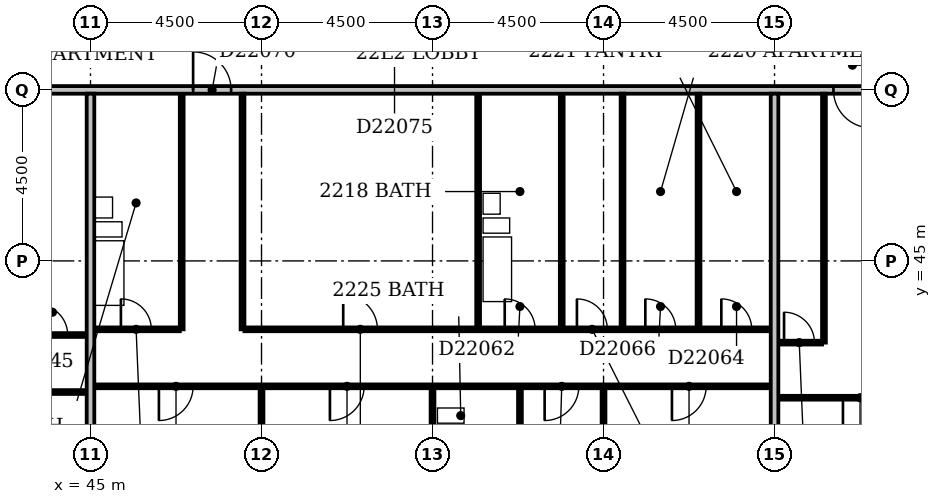
"""IFC4 building model, lengths in metres.
Left out: names, types, materials, properties, quantities, classifications, styles, units other than length and angle.
Written with IfcOpenShell. Run it as: python <this file> out.ifc"""

import sys

from ifc_helpers import new_model, si_unit, direction, frame, frame_2d, origin, place, context, subcontext, project, spatial, rectangle, extrude, element, fill, save


model = new_model("IFC4")
c1 = context("Model", 3, precision=1e-05, world=origin(), true_north=direction((0.0, 1.0)))
c2 = subcontext(c1, "Body", "Model", "MODEL_VIEW")
j1 = project(units=[si_unit("LENGTHUNIT", "METRE"), si_unit("PLANEANGLEUNIT", "RADIAN")], contexts=[c1])
p1 = place(None, origin())
s1 = spatial("IfcSite", under=j1, at=p1, CompositionType="ELEMENT")
p2 = place(p1, origin())
s2 = spatial("IfcBuilding", under=s1, at=p2, CompositionType="ELEMENT")
p3 = place(p2, frame((0.0, 0.0, 90.2)))
s3 = spatial("IfcBuildingStorey", under=s2, at=p3, CompositionType="ELEMENT", Elevation=90.2)
p4 = place(p3, frame((45.0, 36.6, 0.0), z_axis=(0.0, 0.0, 1.0), x_axis=(0.0, 1.0, 0.0)))
e1 = element("IfcWall", 1, at=p4, inside=s3, PredefinedType="PARTITIONING", context=c2, shape_type="SweptSolid", body=[
    extrude(rectangle(XDim=12.8, YDim=0.2, at=frame_2d((6.4, 0.0))), origin(), (0.0, 0.0, 1.0), 2.6),
])
p5 = place(p3, frame((49.5, 36.6, 0.0), z_axis=(0.0, 0.0, 1.0), x_axis=(0.0, 1.0, 0.0)))
e2 = element("IfcWall", 2, at=p5, inside=s3, PredefinedType="PARTITIONING", context=c2, shape_type="SweptSolid", body=[
    extrude(rectangle(XDim=5.05, YDim=0.1, at=frame_2d((2.525, 0.0))), origin(), (0.0, 0.0, 1.0), 3.3),
])
p6 = place(p3, frame((54.0, 36.6, 0.0), z_axis=(0.0, 0.0, 1.0), x_axis=(0.0, 1.0, 0.0)))
e3 = element("IfcWall", 3, at=p6, inside=s3, PredefinedType="PARTITIONING", context=c2, shape_type="SweptSolid", body=[
    extrude(rectangle(XDim=5.05, YDim=0.1, at=frame_2d((2.525, 0.0))), origin(), (0.0, 0.0, 1.0), 2.6),
])
p7 = place(p3, frame((58.5, 36.6, 0.0), z_axis=(0.0, 0.0, 1.0), x_axis=(0.0, 1.0, 0.0)))
e4 = element("IfcWall", 4, at=p7, inside=s3, PredefinedType="PARTITIONING", context=c2, shape_type="SweptSolid", body=[
    extrude(rectangle(XDim=5.05, YDim=0.1, at=frame_2d((2.525, 0.0))), origin(), (0.0, 0.0, 1.0), 3.3),
])
p8 = place(p3, frame((63.0, 36.6, 0.0), z_axis=(0.0, 0.0, 1.0), x_axis=(0.0, 1.0, 0.0)))
e5 = element("IfcWall", 5, at=p8, inside=s3, PredefinedType="PARTITIONING", context=c2, shape_type="SweptSolid", body=[
    extrude(rectangle(XDim=12.8, YDim=0.2, at=frame_2d((6.4, 0.0))), origin(), (0.0, 0.0, 1.0), 2.4),
])
p9 = place(p3, frame((56.3, 38.8, 0.0), z_axis=(0.0, 0.0, 1.0), x_axis=(0.0, 1.0, 0.0)))
e6 = element("IfcWall", 6, at=p9, inside=s3, PredefinedType="PLUMBINGWALL", context=c2, shape_type="SweptSolid", body=[
    extrude(rectangle(XDim=2.85, YDim=0.1, at=frame_2d((1.425, 0.0))), origin(), (0.0, 0.0, 1.0), 3.3),
])
p10 = place(p9, frame((1.05, 0.0, 0.0)))
e7 = element("IfcOpeningElement", 7, at=p10, cuts=e6, PredefinedType="OPENING", context=c2, shape_type="SweptSolid", body=[
    extrude(rectangle(XDim=0.8, YDim=2.1, at=frame_2d((0.4, 1.05))), frame((0.0, 0.062, 0.0), z_axis=(0.0, -1.0, 0.0), x_axis=(1.0, 0.0, 0.0)), (0.0, 0.0, 1.0), 0.124),
])
p11 = place(p3, frame((63.1, 41.4, 0.0), z_axis=(0.0, 0.0, 1.0), x_axis=(1.0, 0.0, 0.0)))
e8 = element("IfcWall", 8, at=p11, inside=s3, PredefinedType="PARTITIONING", context=c2, shape_type="SweptSolid", body=[
    extrude(rectangle(XDim=5.0, YDim=0.1, at=frame_2d((2.5, 0.0))), origin(), (0.0, 0.0, 1.0), 3.3),
])
p12 = place(p11, frame((1.7, 0.0, 0.0)))
e9 = element("IfcOpeningElement", 9, at=p12, cuts=e8, PredefinedType="OPENING", context=c2, shape_type="SweptSolid", body=[
    extrude(rectangle(XDim=0.9, YDim=2.1, at=frame_2d((0.45, 1.05))), frame((0.0, 0.062, 0.0), z_axis=(0.0, -1.0, 0.0), x_axis=(1.0, 0.0, 0.0)), (0.0, 0.0, 1.0), 0.124),
])
p13 = place(p3, frame((31.6, 41.55, 0.0), z_axis=(0.0, 0.0, 1.0), x_axis=(1.0, 0.0, 0.0)))
e10 = element("IfcWall", 10, at=p13, inside=s3, PredefinedType="PARTITIONING", context=c2, shape_type="SweptSolid", body=[
    extrude(rectangle(XDim=13.3, YDim=0.1, at=frame_2d((6.65, 0.0))), origin(), (0.0, 0.0, 1.0), 3.3),
])
p14 = place(p13, frame((3.9, 0.0, 0.0)))
e11 = element("IfcOpeningElement", 11, at=p14, cuts=e10, PredefinedType="OPENING", context=c2, shape_type="SweptSolid", body=[
    extrude(rectangle(XDim=0.9, YDim=2.1, at=frame_2d((0.45, 1.05))), frame((0.0, 0.062, 0.0), z_axis=(0.0, -1.0, 0.0), x_axis=(1.0, 0.0, 0.0)), (0.0, 0.0, 1.0), 0.124),
])
p15 = place(p13, frame((10.7, 0.0, 0.0)))
e12 = element("IfcOpeningElement", 12, at=p15, cuts=e10, PredefinedType="OPENING", context=c2, shape_type="SweptSolid", body=[
    extrude(rectangle(XDim=0.9, YDim=2.1, at=frame_2d((0.45, 1.05))), frame((0.0, 0.062, 0.0), z_axis=(0.0, -1.0, 0.0), x_axis=(1.0, 0.0, 0.0)), (0.0, 0.0, 1.0), 0.124),
])
p16 = place(p3, frame((45.1, 41.7, 0.0), z_axis=(0.0, 0.0, 1.0), x_axis=(1.0, 0.0, 0.0)))
e13 = element("IfcWall", 13, at=p16, inside=s3, PredefinedType="PARTITIONING", context=c2, shape_type="SweptSolid", body=[
    extrude(rectangle(XDim=17.8, YDim=0.1, at=frame_2d((8.9, 0.0))), origin(), (0.0, 0.0, 1.0), 3.3),
])
p17 = place(p16, frame((1.7, 0.0, 0.0)))
e14 = element("IfcOpeningElement", 14, at=p17, cuts=e13, PredefinedType="OPENING", context=c2, shape_type="SweptSolid", body=[
    extrude(rectangle(XDim=0.9, YDim=2.1, at=frame_2d((0.45, 1.05))), frame((0.0, 0.062, 0.0), z_axis=(0.0, -1.0, 0.0), x_axis=(1.0, 0.0, 0.0)), (0.0, 0.0, 1.0), 0.124),
])
p18 = place(p16, frame((6.2, 0.0, 0.0)))
e15 = element("IfcOpeningElement", 15, at=p18, cuts=e13, PredefinedType="OPENING", context=c2, shape_type="SweptSolid", body=[
    extrude(rectangle(XDim=0.9, YDim=2.1, at=frame_2d((0.45, 1.05))), frame((0.0, 0.062, 0.0), z_axis=(0.0, -1.0, 0.0), x_axis=(1.0, 0.0, 0.0)), (0.0, 0.0, 1.0), 0.124),
])
p19 = place(p16, frame((11.85, 0.0, 0.0)))
e16 = element("IfcOpeningElement", 16, at=p19, cuts=e13, PredefinedType="OPENING", context=c2, shape_type="SweptSolid", body=[
    extrude(rectangle(XDim=0.9, YDim=2.1, at=frame_2d((0.45, 1.05))), frame((0.0, 0.062, 0.0), z_axis=(0.0, -1.0, 0.0), x_axis=(1.0, 0.0, 0.0)), (0.0, 0.0, 1.0), 0.124),
])
p20 = place(p16, frame((15.2, 0.0, 0.0)))
e17 = element("IfcOpeningElement", 17, at=p20, cuts=e13, PredefinedType="OPENING", context=c2, shape_type="SweptSolid", body=[
    extrude(rectangle(XDim=0.9, YDim=2.1, at=frame_2d((0.45, 1.05))), frame((0.0, 0.062, 0.0), z_axis=(0.0, -1.0, 0.0), x_axis=(1.0, 0.0, 0.0)), (0.0, 0.0, 1.0), 0.124),
])
p21 = place(p3, frame((63.1, 42.85, 0.0), z_axis=(0.0, 0.0, 1.0), x_axis=(1.0, 0.0, 0.0)))
e18 = element("IfcWall", 18, at=p21, inside=s3, PredefinedType="PARTITIONING", context=c2, shape_type="SweptSolid", body=[
    extrude(rectangle(XDim=1.15, YDim=0.1, at=frame_2d((0.575, 0.0))), origin(), (0.0, 0.0, 1.0), 3.3),
])
p22 = place(p21, frame((0.15, 0.0, 0.0)))
e19 = element("IfcOpeningElement", 19, at=p22, cuts=e18, PredefinedType="OPENING", context=c2, shape_type="SweptSolid", body=[
    extrude(rectangle(XDim=0.8, YDim=2.1, at=frame_2d((0.4, 1.05))), frame((0.0, 0.062, 0.0), z_axis=(0.0, -1.0, 0.0), x_axis=(1.0, 0.0, 0.0)), (0.0, 0.0, 1.0), 0.124),
])
p23 = place(p3, frame((64.3, 42.85, 0.0), z_axis=(0.0, 0.0, 1.0), x_axis=(0.0, 1.0, 0.0)))
e20 = element("IfcWall", 20, at=p23, inside=s3, PredefinedType="PARTITIONING", context=c2, shape_type="SweptSolid", body=[
    extrude(rectangle(XDim=6.55, YDim=0.1, at=frame_2d((3.275, 0.0))), origin(), (0.0, 0.0, 1.0), 3.3),
])
p24 = place(p3, frame((33.15, 43.05, 0.0), z_axis=(0.0, 0.0, 1.0), x_axis=(1.0, 0.0, 0.0)))
e21 = element("IfcWall", 21, at=p24, inside=s3, PredefinedType="PARTITIONING", context=c2, shape_type="SweptSolid", body=[
    extrude(rectangle(XDim=11.75, YDim=0.1, at=frame_2d((5.875, 0.0))), origin(), (0.0, 0.0, 1.0), 3.3),
])
p25 = place(p24, frame((5.15, 0.0, 0.0)))
e22 = element("IfcOpeningElement", 22, at=p25, cuts=e21, PredefinedType="OPENING", context=c2, shape_type="SweptSolid", body=[
    extrude(rectangle(XDim=0.8, YDim=2.1, at=frame_2d((0.4, 1.05))), frame((0.0, 0.062, 0.0), z_axis=(0.0, -1.0, 0.0), x_axis=(1.0, 0.0, 0.0)), (0.0, 0.0, 1.0), 0.124),
])
p26 = place(p24, frame((1.7, 0.0, 0.0)))
e23 = element("IfcOpeningElement", 23, at=p26, cuts=e21, PredefinedType="OPENING", context=c2, shape_type="SweptSolid", body=[
    extrude(rectangle(XDim=0.9, YDim=2.1, at=frame_2d((0.45, 1.05))), frame((0.0, 0.062, 0.0), z_axis=(0.0, -1.0, 0.0), x_axis=(1.0, 0.0, 0.0)), (0.0, 0.0, 1.0), 0.124),
])
p27 = place(p24, frame((8.65, 0.0, 0.0)))
e24 = element("IfcOpeningElement", 24, at=p27, cuts=e21, PredefinedType="OPENING", context=c2, shape_type="SweptSolid", body=[
    extrude(rectangle(XDim=0.8, YDim=2.1, at=frame_2d((0.4, 1.05))), frame((0.0, 0.062, 0.0), z_axis=(0.0, -1.0, 0.0), x_axis=(1.0, 0.0, 0.0)), (0.0, 0.0, 1.0), 0.124),
])
p28 = place(p24, frame((10.45, 0.0, 0.0)))
e25 = element("IfcOpeningElement", 25, at=p28, cuts=e21, PredefinedType="OPENING", context=c2, shape_type="SweptSolid", body=[
    extrude(rectangle(XDim=0.8, YDim=2.1, at=frame_2d((0.4, 1.05))), frame((0.0, 0.062, 0.0), z_axis=(0.0, -1.0, 0.0), x_axis=(1.0, 0.0, 0.0)), (0.0, 0.0, 1.0), 0.124),
])
p29 = place(p24, frame((7.1, 0.0, 0.0)))
e26 = element("IfcOpeningElement", 26, at=p29, cuts=e21, PredefinedType="OPENING", context=c2, shape_type="SweptSolid", body=[
    extrude(rectangle(XDim=0.8, YDim=2.1, at=frame_2d((0.4, 1.05))), frame((0.0, 0.062, 0.0), z_axis=(0.0, -1.0, 0.0), x_axis=(1.0, 0.0, 0.0)), (0.0, 0.0, 1.0), 0.124),
])
p30 = place(p3, frame((45.1, 43.2, 0.0), z_axis=(0.0, 0.0, 1.0), x_axis=(1.0, 0.0, 0.0)))
e27 = element("IfcWall", 27, at=p30, inside=s3, PredefinedType="PARTITIONING", context=c2, shape_type="SweptSolid", body=[
    extrude(rectangle(XDim=2.25, YDim=0.1, at=frame_2d((1.125, 0.0))), origin(), (0.0, 0.0, 1.0), 3.3),
])
p31 = place(p30, frame((0.7, 0.0, 0.0)))
e28 = element("IfcOpeningElement", 28, at=p31, cuts=e27, PredefinedType="OPENING", context=c2, shape_type="SweptSolid", body=[
    extrude(rectangle(XDim=0.8, YDim=2.1, at=frame_2d((0.4, 1.05))), frame((0.0, 0.062, 0.0), z_axis=(0.0, -1.0, 0.0), x_axis=(1.0, 0.0, 0.0)), (0.0, 0.0, 1.0), 0.124),
])
p32 = place(p3, frame((47.4, 43.2, 0.0), z_axis=(0.0, 0.0, 1.0), x_axis=(0.0, 1.0, 0.0)))
e29 = element("IfcWall", 29, at=p32, inside=s3, PredefinedType="PLUMBINGWALL", context=c2, shape_type="SweptSolid", body=[
    extrude(rectangle(XDim=6.2, YDim=0.1, at=frame_2d((3.1, 0.0))), origin(), (0.0, 0.0, 1.0), 3.3),
])
p33 = place(p3, frame((49.0, 43.2, 0.0), z_axis=(0.0, 0.0, 1.0), x_axis=(0.0, 1.0, 0.0)))
e30 = element("IfcWall", 30, at=p33, inside=s3, PredefinedType="PARTITIONING", context=c2, shape_type="SweptSolid", body=[
    extrude(rectangle(XDim=6.2, YDim=0.1, at=frame_2d((3.1, 0.0))), origin(), (0.0, 0.0, 1.0), 3.3),
])
p34 = place(p3, frame((49.05, 43.2, 0.0), z_axis=(0.0, 0.0, 1.0), x_axis=(1.0, 0.0, 0.0)))
e31 = element("IfcWall", 31, at=p34, inside=s3, PredefinedType="PARTITIONING", context=c2, shape_type="SweptSolid", body=[
    extrude(rectangle(XDim=13.85, YDim=0.1, at=frame_2d((6.925, 0.0))), origin(), (0.0, 0.0, 1.0), 3.3),
])
p35 = place(p34, frame((6.85, 0.0, 0.0)))
e32 = element("IfcOpeningElement", 32, at=p35, cuts=e31, PredefinedType="OPENING", context=c2, shape_type="SweptSolid", body=[
    extrude(rectangle(XDim=0.8, YDim=2.1, at=frame_2d((0.4, 1.05))), frame((0.0, 0.062, 0.0), z_axis=(0.0, -1.0, 0.0), x_axis=(1.0, 0.0, 0.0)), (0.0, 0.0, 1.0), 0.124),
])
p36 = place(p34, frame((2.6, 0.0, 0.0)))
e33 = element("IfcOpeningElement", 33, at=p36, cuts=e31, PredefinedType="OPENING", context=c2, shape_type="SweptSolid", body=[
    extrude(rectangle(XDim=0.9, YDim=2.1, at=frame_2d((0.45, 1.05))), frame((0.0, 0.062, 0.0), z_axis=(0.0, -1.0, 0.0), x_axis=(1.0, 0.0, 0.0)), (0.0, 0.0, 1.0), 0.124),
])
p37 = place(p34, frame((12.55, 0.0, 0.0)))
e34 = element("IfcOpeningElement", 34, at=p37, cuts=e31, PredefinedType="OPENING", context=c2, shape_type="SweptSolid", body=[
    extrude(rectangle(XDim=0.8, YDim=2.1, at=frame_2d((0.4, 1.05))), frame((0.0, 0.062, 0.0), z_axis=(0.0, -1.0, 0.0), x_axis=(1.0, 0.0, 0.0)), (0.0, 0.0, 1.0), 0.124),
])
p38 = place(p34, frame((8.75, 0.0, 0.0)))
e35 = element("IfcOpeningElement", 35, at=p38, cuts=e31, PredefinedType="OPENING", context=c2, shape_type="SweptSolid", body=[
    extrude(rectangle(XDim=0.8, YDim=2.1, at=frame_2d((0.4, 1.05))), frame((0.0, 0.062, 0.0), z_axis=(0.0, -1.0, 0.0), x_axis=(1.0, 0.0, 0.0)), (0.0, 0.0, 1.0), 0.124),
])
p39 = place(p34, frame((10.55, 0.0, 0.0)))
e36 = element("IfcOpeningElement", 36, at=p39, cuts=e31, PredefinedType="OPENING", context=c2, shape_type="SweptSolid", body=[
    extrude(rectangle(XDim=0.8, YDim=2.1, at=frame_2d((0.4, 1.05))), frame((0.0, 0.062, 0.0), z_axis=(0.0, -1.0, 0.0), x_axis=(1.0, 0.0, 0.0)), (0.0, 0.0, 1.0), 0.124),
])
for number, where, z_axis, x_axis in (
    (37, (55.2, 43.25, 0.0), (0.0, 0.0, 1.0), (0.0, 1.0, 0.0)),
    (38, (57.4, 43.25, 0.0), (0.0, 0.0, 1.0), (0.0, 1.0, 0.0)),
):
    element("IfcWall", number, at=place(p3, frame(where, z_axis=z_axis, x_axis=x_axis)), inside=s3, PredefinedType="PLUMBINGWALL", context=c2, shape_type="SweptSolid", body=[
        extrude(rectangle(XDim=6.15, YDim=0.1, at=frame_2d((3.075, 0.0))), origin(), (0.0, 0.0, 1.0), 3.3),
    ])
for number, where, z_axis, x_axis in (
    (39, (59.0, 43.25, 0.0), (0.0, 0.0, 1.0), (0.0, 1.0, 0.0)),
    (40, (61.0, 43.25, 0.0), (0.0, 0.0, 1.0), (0.0, 1.0, 0.0)),
):
    element("IfcWall", number, at=place(p3, frame(where, z_axis=z_axis, x_axis=x_axis)), inside=s3, PredefinedType="PARTITIONING", context=c2, shape_type="SweptSolid", body=[
        extrude(rectangle(XDim=6.15, YDim=0.1, at=frame_2d((3.075, 0.0))), origin(), (0.0, 0.0, 1.0), 3.3),
    ])
p40 = place(p3, frame((9.1, 49.5, 0.0), z_axis=(0.0, 0.0, 1.0), x_axis=(1.0, 0.0, 0.0)))
e41 = element("IfcWall", 41, at=p40, inside=s3, PredefinedType="PARTITIONING", context=c2, shape_type="SweptSolid", body=[
    extrude(rectangle(XDim=57.8, YDim=0.2, at=frame_2d((28.9, 0.0))), origin(), (0.0, 0.0, 1.0), 3.3),
])
p41 = place(p40, frame((13.7, 0.0, 0.0)))
e42 = element("IfcOpeningElement", 42, at=p41, cuts=e41, PredefinedType="OPENING", context=c2, shape_type="SweptSolid", body=[
    extrude(rectangle(XDim=1.0, YDim=2.1, at=frame_2d((0.5, 1.05))), frame((0.0, 0.112, 0.0), z_axis=(0.0, -1.0, 0.0), x_axis=(1.0, 0.0, 0.0)), (0.0, 0.0, 1.0), 0.224),
])
p42 = place(p40, frame((22.7, 0.0, 0.0)))
e43 = element("IfcOpeningElement", 43, at=p42, cuts=e41, PredefinedType="OPENING", context=c2, shape_type="SweptSolid", body=[
    extrude(rectangle(XDim=1.0, YDim=2.1, at=frame_2d((0.5, 1.05))), frame((0.0, 0.112, 0.0), z_axis=(0.0, -1.0, 0.0), x_axis=(1.0, 0.0, 0.0)), (0.0, 0.0, 1.0), 0.224),
])
p43 = place(p40, frame((38.6, 0.0, 0.0)))
e44 = element("IfcOpeningElement", 44, at=p43, cuts=e41, PredefinedType="OPENING", context=c2, shape_type="SweptSolid", body=[
    extrude(rectangle(XDim=1.0, YDim=2.1, at=frame_2d((0.5, 1.05))), frame((0.0, 0.112, 0.0), z_axis=(0.0, -1.0, 0.0), x_axis=(1.0, 0.0, 0.0)), (0.0, 0.0, 1.0), 0.224),
])
p44 = place(p40, frame((55.45, 0.0, 0.0)))
e45 = element("IfcOpeningElement", 45, at=p44, cuts=e41, PredefinedType="OPENING", context=c2, shape_type="SweptSolid", body=[
    extrude(rectangle(XDim=1.0, YDim=2.1, at=frame_2d((0.5, 1.05))), frame((0.0, 0.112, 0.0), z_axis=(0.0, -1.0, 0.0), x_axis=(1.0, 0.0, 0.0)), (0.0, 0.0, 1.0), 0.224),
])
p45 = place(p40, frame((6.15, 0.0, 0.0)))
e46 = element("IfcOpeningElement", 46, at=p45, cuts=e41, PredefinedType="OPENING", context=c2, shape_type="SweptSolid", body=[
    extrude(rectangle(XDim=0.9, YDim=2.1, at=frame_2d((0.45, 1.05))), frame((0.0, 0.112, 0.0), z_axis=(0.0, -1.0, 0.0), x_axis=(1.0, 0.0, 0.0)), (0.0, 0.0, 1.0), 0.224),
])
p46 = place(p12, frame((0.9, 0.0, 0.0), z_axis=(0.0, 0.0, 1.0), x_axis=(-1.0, 0.0, 0.0)))
e47 = element("IfcDoor", 47, at=p46, inside=s3, OperationType="SINGLE_SWING_RIGHT", PredefinedType="DOOR", context=c2, shape_type="SweptSolid", body=[
    extrude(rectangle(XDim=0.9, YDim=2.1, at=frame_2d((0.45, 1.05))), frame((0.0, 0.025, 0.0), z_axis=(0.0, -1.0, 0.0), x_axis=(1.0, 0.0, 0.0)), (0.0, 0.0, 1.0), 0.05),
])
fill(e9, e47)
p47 = place(p17, frame((0.9, 0.0, 0.0), z_axis=(0.0, 0.0, 1.0), x_axis=(-1.0, 0.0, 0.0)))
e48 = element("IfcDoor", 48, at=p47, inside=s3, OperationType="SINGLE_SWING_RIGHT", PredefinedType="DOOR", context=c2, shape_type="SweptSolid", body=[
    extrude(rectangle(XDim=0.9, YDim=2.1, at=frame_2d((0.45, 1.05))), frame((0.0, 0.025, 0.0), z_axis=(0.0, -1.0, 0.0), x_axis=(1.0, 0.0, 0.0)), (0.0, 0.0, 1.0), 0.05),
])
fill(e14, e48)
p48 = place(p18, frame((0.9, 0.0, 0.0), z_axis=(0.0, 0.0, 1.0), x_axis=(-1.0, 0.0, 0.0)))
e49 = element("IfcDoor", 49, at=p48, inside=s3, OperationType="SINGLE_SWING_RIGHT", PredefinedType="DOOR", context=c2, shape_type="SweptSolid", body=[
    extrude(rectangle(XDim=0.9, YDim=2.1, at=frame_2d((0.45, 1.05))), frame((0.0, 0.025, 0.0), z_axis=(0.0, -1.0, 0.0), x_axis=(1.0, 0.0, 0.0)), (0.0, 0.0, 1.0), 0.05),
])
fill(e15, e49)
p49 = place(p19, frame((0.9, 0.0, 0.0), z_axis=(0.0, 0.0, 1.0), x_axis=(-1.0, 0.0, 0.0)))
e50 = element("IfcDoor", 50, at=p49, inside=s3, OperationType="SINGLE_SWING_RIGHT", PredefinedType="DOOR", context=c2, shape_type="SweptSolid", body=[
    extrude(rectangle(XDim=0.9, YDim=2.1, at=frame_2d((0.45, 1.05))), frame((0.0, 0.025, 0.0), z_axis=(0.0, -1.0, 0.0), x_axis=(1.0, 0.0, 0.0)), (0.0, 0.0, 1.0), 0.05),
])
fill(e16, e50)
p50 = place(p20, frame((0.9, 0.0, 0.0), z_axis=(0.0, 0.0, 1.0), x_axis=(-1.0, 0.0, 0.0)))
e51 = element("IfcDoor", 51, at=p50, inside=s3, OperationType="SINGLE_SWING_RIGHT", PredefinedType="DOOR", context=c2, shape_type="SweptSolid", body=[
    extrude(rectangle(XDim=0.9, YDim=2.1, at=frame_2d((0.45, 1.05))), frame((0.0, 0.025, 0.0), z_axis=(0.0, -1.0, 0.0), x_axis=(1.0, 0.0, 0.0)), (0.0, 0.0, 1.0), 0.05),
])
fill(e17, e51)
p51 = place(p22, origin())
e52 = element("IfcDoor", 52, at=p51, inside=s3, OperationType="SINGLE_SWING_LEFT", PredefinedType="DOOR", context=c2, shape_type="SweptSolid", body=[
    extrude(rectangle(XDim=0.8, YDim=2.1, at=frame_2d((0.4, 1.05))), frame((0.0, 0.025, 0.0), z_axis=(0.0, -1.0, 0.0), x_axis=(1.0, 0.0, 0.0)), (0.0, 0.0, 1.0), 0.05),
])
fill(e19, e52)
p52 = place(p28, origin())
e53 = element("IfcDoor", 53, at=p52, inside=s3, OperationType="SINGLE_SWING_LEFT", PredefinedType="DOOR", context=c2, shape_type="SweptSolid", body=[
    extrude(rectangle(XDim=0.8, YDim=2.1, at=frame_2d((0.4, 1.05))), frame((0.0, 0.025, 0.0), z_axis=(0.0, -1.0, 0.0), x_axis=(1.0, 0.0, 0.0)), (0.0, 0.0, 1.0), 0.05),
])
fill(e25, e53)
p53 = place(p31, origin())
e54 = element("IfcDoor", 54, at=p53, inside=s3, OperationType="SINGLE_SWING_LEFT", PredefinedType="DOOR", context=c2, shape_type="SweptSolid", body=[
    extrude(rectangle(XDim=0.8, YDim=2.1, at=frame_2d((0.4, 1.05))), frame((0.0, 0.025, 0.0), z_axis=(0.0, -1.0, 0.0), x_axis=(1.0, 0.0, 0.0)), (0.0, 0.0, 1.0), 0.05),
])
fill(e28, e54)
p54 = place(p35, origin())
e55 = element("IfcDoor", 55, at=p54, inside=s3, OperationType="SINGLE_SWING_LEFT", PredefinedType="DOOR", context=c2, shape_type="SweptSolid", body=[
    extrude(rectangle(XDim=0.8, YDim=2.1, at=frame_2d((0.4, 1.05))), frame((0.0, 0.025, 0.0), z_axis=(0.0, -1.0, 0.0), x_axis=(1.0, 0.0, 0.0)), (0.0, 0.0, 1.0), 0.05),
])
fill(e32, e55)
p55 = place(p36, origin())
e56 = element("IfcDoor", 56, at=p55, inside=s3, OperationType="SINGLE_SWING_LEFT", PredefinedType="DOOR", context=c2, shape_type="SweptSolid", body=[
    extrude(rectangle(XDim=0.9, YDim=2.1, at=frame_2d((0.45, 1.05))), frame((0.0, 0.025, 0.0), z_axis=(0.0, -1.0, 0.0), x_axis=(1.0, 0.0, 0.0)), (0.0, 0.0, 1.0), 0.05),
])
fill(e33, e56)
p56 = place(p37, origin())
e57 = element("IfcDoor", 57, at=p56, inside=s3, OperationType="SINGLE_SWING_LEFT", PredefinedType="DOOR", context=c2, shape_type="SweptSolid", body=[
    extrude(rectangle(XDim=0.8, YDim=2.1, at=frame_2d((0.4, 1.05))), frame((0.0, 0.025, 0.0), z_axis=(0.0, -1.0, 0.0), x_axis=(1.0, 0.0, 0.0)), (0.0, 0.0, 1.0), 0.05),
])
fill(e34, e57)
p57 = place(p38, origin())
e58 = element("IfcDoor", 58, at=p57, inside=s3, OperationType="SINGLE_SWING_LEFT", PredefinedType="DOOR", context=c2, shape_type="SweptSolid", body=[
    extrude(rectangle(XDim=0.8, YDim=2.1, at=frame_2d((0.4, 1.05))), frame((0.0, 0.025, 0.0), z_axis=(0.0, -1.0, 0.0), x_axis=(1.0, 0.0, 0.0)), (0.0, 0.0, 1.0), 0.05),
])
fill(e35, e58)
p58 = place(p39, origin())
e59 = element("IfcDoor", 59, at=p58, inside=s3, OperationType="SINGLE_SWING_LEFT", PredefinedType="DOOR", context=c2, shape_type="SweptSolid", body=[
    extrude(rectangle(XDim=0.8, YDim=2.1, at=frame_2d((0.4, 1.05))), frame((0.0, 0.025, 0.0), z_axis=(0.0, -1.0, 0.0), x_axis=(1.0, 0.0, 0.0)), (0.0, 0.0, 1.0), 0.05),
])
fill(e36, e59)
p59 = place(p43, origin())
e60 = element("IfcDoor", 60, at=p59, inside=s3, OperationType="SINGLE_SWING_LEFT", PredefinedType="DOOR", context=c2, shape_type="SweptSolid", body=[
    extrude(rectangle(XDim=1.0, YDim=2.1, at=frame_2d((0.5, 1.05))), frame((0.0, 0.025, 0.0), z_axis=(0.0, -1.0, 0.0), x_axis=(1.0, 0.0, 0.0)), (0.0, 0.0, 1.0), 0.05),
])
fill(e44, e60)
p60 = place(p44, origin())
e61 = element("IfcDoor", 61, at=p60, inside=s3, OperationType="SINGLE_SWING_RIGHT", PredefinedType="DOOR", context=c2, shape_type="SweptSolid", body=[
    extrude(rectangle(XDim=1.0, YDim=2.1, at=frame_2d((0.5, 1.05))), frame((0.0, 0.025, 0.0), z_axis=(0.0, -1.0, 0.0), x_axis=(1.0, 0.0, 0.0)), (0.0, 0.0, 1.0), 0.05),
])
fill(e45, e61)
save(model, sys.argv[1])
